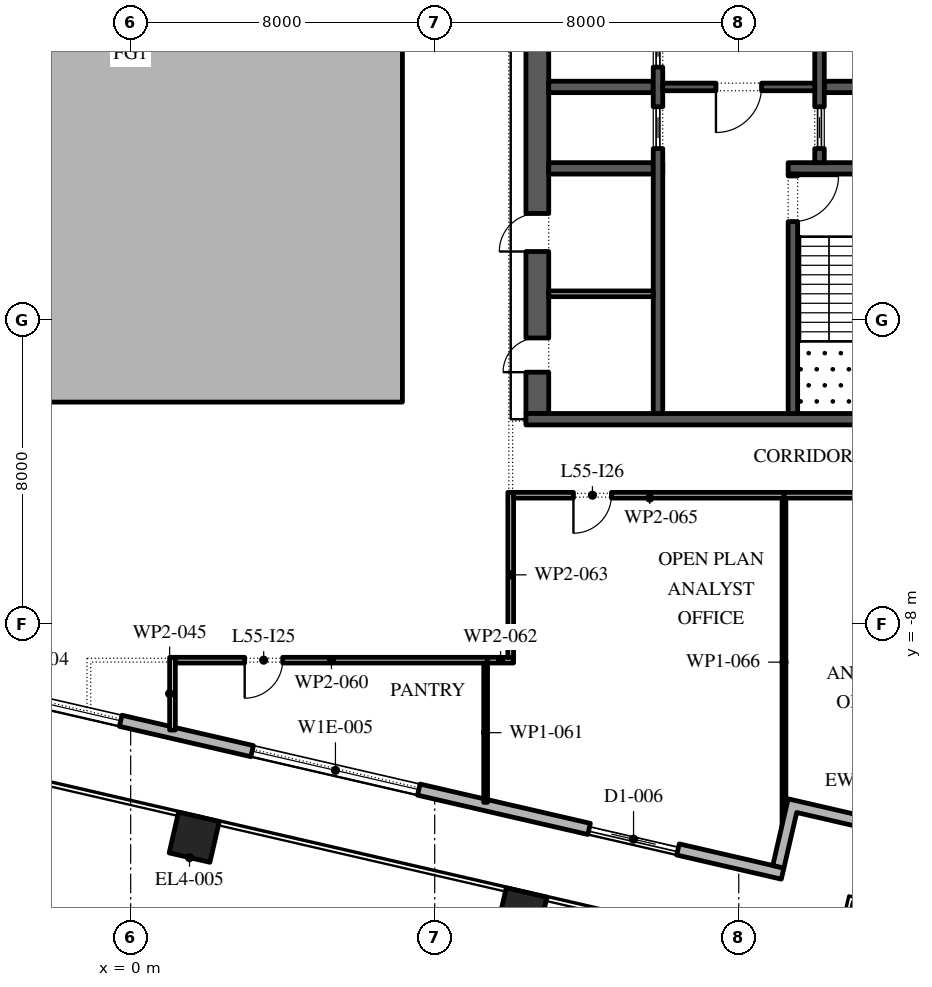
"""IFC4 building model, lengths in metres.
Left out: names, types, materials, properties, quantities, classifications, styles, units other than length and angle.
Written with IfcOpenShell. Run it as: python <this file> out.ifc"""

import sys

from ifc_helpers import new_model, si_unit, direction, frame, frame_2d, origin, origin_2d, place, context, subcontext, project, spatial, polyline, rectangle, outline, extrude, element, fill, save


model = new_model("IFC4")
c1 = context("Model", 3, precision=1e-05, world=origin(), true_north=direction((0.0, 1.0)))
c2 = subcontext(c1, "Body", "Model", "MODEL_VIEW")
j1 = project(units=[si_unit("LENGTHUNIT", "METRE"), si_unit("PLANEANGLEUNIT", "RADIAN")], contexts=[c1])
p1 = place(None, origin())
s1 = spatial("IfcSite", under=j1, at=p1, CompositionType="ELEMENT")
p2 = place(p1, origin())
s2 = spatial("IfcBuilding", under=s1, at=p2, CompositionType="ELEMENT")
p3 = place(p2, frame((0.0, 0.0, 255.6)))
s3 = spatial("IfcBuildingStorey", under=s2, at=p3, CompositionType="ELEMENT", Elevation=255.6)
for number, where, z_axis, x_axis in (
    (1, (1.672, -13.599, 0.0), (0.0, 0.0, 1.0), (0.974, -0.225, 0.0)),
    (2, (10.295, -15.59, 0.0), (0.0, 0.0, 1.0), (0.974, -0.225, 0.0)),
):
    element("IfcColumn", number, at=place(p3, frame(where, z_axis=z_axis, x_axis=x_axis)), inside=s3, PredefinedType="COLUMN", context=c2, shape_type="SweptSolid", body=[
        extrude(rectangle(XDim=1.1, YDim=1.1, at=origin_2d()), origin(), (0.0, 0.0, 1.0), 4.2),
    ])
p4 = place(p3, origin())
e3 = element("IfcWall", 3, at=p4, inside=s3, PredefinedType="STANDARD", context=c2, shape_type="SweptSolid", body=[
    extrude(outline(polyline([(-7.15, -2.15), (7.15, -2.15), (7.15, 16.15), (-7.15, 16.15), (-7.15, -2.15)]), holes=[polyline([(-7.0, -2.0), (-7.0, 16.0), (7.0, 16.0), (7.0, -2.0), (-7.0, -2.0)])]), origin(), (0.0, 0.0, 1.0), 4.0),
])
p5 = place(p3, frame((-29.616, -3.758, 0.0), z_axis=(0.0, 0.0, 1.0), x_axis=(0.974370532314, -0.224949029246, 0.0)))
e4 = element("IfcWall", 4, at=p5, inside=s3, PredefinedType="STANDARD", context=c2, shape_type="SweptSolid", body=[
    extrude(rectangle(XDim=48.0, YDim=0.3, at=frame_2d((24.0, 0.0))), origin(), (0.0, 0.0, 1.0), 4.0),
])
p6 = place(p5, frame((1.625, 0.0, 0.45)))
e5 = element("IfcOpeningElement", 5, at=p6, cuts=e4, PredefinedType="OPENING", context=c2, shape_type="SweptSolid", body=[
    extrude(rectangle(XDim=4.5, YDim=3.05, at=frame_2d((2.25, 1.525))), frame((0.0, 0.16, 0.0), z_axis=(0.0, -1.0, 0.0), x_axis=(1.0, 0.0, 0.0)), (0.0, 0.0, 1.0), 0.32),
])
p7 = place(p5, frame((10.575, 0.0, 0.0)))
e6 = element("IfcOpeningElement", 6, at=p7, cuts=e4, PredefinedType="OPENING", context=c2, shape_type="SweptSolid", body=[
    extrude(rectangle(XDim=2.4, YDim=3.5, at=frame_2d((1.2, 1.75))), frame((0.0, 0.16, 0.0), z_axis=(0.0, -1.0, 0.0), x_axis=(1.0, 0.0, 0.0)), (0.0, 0.0, 1.0), 0.32),
])
p8 = place(p5, frame((17.575, 0.0, 0.45)))
e7 = element("IfcOpeningElement", 7, at=p8, cuts=e4, PredefinedType="OPENING", context=c2, shape_type="SweptSolid", body=[
    extrude(rectangle(XDim=4.5, YDim=3.0, at=frame_2d((2.25, 1.5))), frame((0.0, 0.16, 0.0), z_axis=(0.0, -1.0, 0.0), x_axis=(1.0, 0.0, 0.0)), (0.0, 0.0, 1.0), 0.32),
])
p9 = place(p5, frame((25.625, 0.0, 0.45)))
e8 = element("IfcOpeningElement", 8, at=p9, cuts=e4, PredefinedType="OPENING", context=c2, shape_type="SweptSolid", body=[
    extrude(rectangle(XDim=4.5, YDim=3.05, at=frame_2d((2.25, 1.525))), frame((0.0, 0.16, 0.0), z_axis=(0.0, -1.0, 0.0), x_axis=(1.0, 0.0, 0.0)), (0.0, 0.0, 1.0), 0.32),
])
p10 = place(p5, frame((33.675, 0.0, 0.45)))
e9 = element("IfcOpeningElement", 9, at=p10, cuts=e4, PredefinedType="OPENING", context=c2, shape_type="SweptSolid", body=[
    extrude(rectangle(XDim=4.5, YDim=2.825, at=frame_2d((2.25, 1.413))), frame((0.0, 0.16, 0.0), z_axis=(0.0, -1.0, 0.0), x_axis=(1.0, 0.0, 0.0)), (0.0, 0.0, 1.0), 0.32),
])
p11 = place(p5, frame((42.775, 0.0, 0.0)))
e10 = element("IfcOpeningElement", 10, at=p11, cuts=e4, PredefinedType="OPENING", context=c2, shape_type="SweptSolid", body=[
    extrude(rectangle(XDim=2.4, YDim=3.5, at=frame_2d((1.2, 1.75))), frame((0.0, 0.16, 0.0), z_axis=(0.0, -1.0, 0.0), x_axis=(1.0, 0.0, 0.0)), (0.0, 0.0, 1.0), 0.32),
])
p12 = place(p3, origin())
e11 = element("IfcWall", 11, at=p12, inside=s3, PredefinedType="STANDARD", context=c2, shape_type="SweptSolid", body=[
    extrude(outline(polyline([(19.054, -12.993), (19.459, -11.24), (21.505, -11.712), (21.438, -12.004), (19.684, -11.599), (19.279, -13.353), (17.525, -12.948), (17.188, -14.41), (16.895, -14.342), (17.3, -12.588), (19.054, -12.993)])), origin(), (0.0, 0.0, 1.0), 4.0),
])
p13 = place(p3, frame((10.7, -2.45, 0.0), z_axis=(0.0, 0.0, 1.0), x_axis=(0.0, 1.0, 0.0)))
e12 = element("IfcWall", 12, at=p13, inside=s3, PredefinedType="SHEAR", context=c2, shape_type="SweptSolid", body=[
    extrude(rectangle(XDim=27.9, YDim=0.6, at=frame_2d((13.95, 0.0))), origin(), (0.0, 0.0, 1.0), 4.0),
])
p14 = place(p13, frame((23.65, 0.0, 0.0)))
e13 = element("IfcOpeningElement", 13, at=p14, cuts=e12, PredefinedType="OPENING", context=c2, shape_type="SweptSolid", body=[
    extrude(rectangle(XDim=2.4, YDim=2.1, at=frame_2d((1.2, 1.05))), frame((0.0, 0.31, 0.0), z_axis=(0.0, -1.0, 0.0), x_axis=(1.0, 0.0, 0.0)), (0.0, 0.0, 1.0), 0.62),
])
p15 = place(p13, frame((1.087, 0.0, 0.0)))
e14 = element("IfcOpeningElement", 14, at=p15, cuts=e12, PredefinedType="OPENING", context=c2, shape_type="SweptSolid", body=[
    extrude(rectangle(XDim=0.9, YDim=2.1, at=frame_2d((0.45, 1.05))), frame((0.0, 0.31, 0.0), z_axis=(0.0, -1.0, 0.0), x_axis=(1.0, 0.0, 0.0)), (0.0, 0.0, 1.0), 0.62),
])
p16 = place(p13, frame((4.262, 0.0, 0.0)))
e15 = element("IfcOpeningElement", 15, at=p16, cuts=e12, PredefinedType="OPENING", context=c2, shape_type="SweptSolid", body=[
    extrude(rectangle(XDim=1.0, YDim=2.1, at=frame_2d((0.5, 1.05))), frame((0.0, 0.31, 0.0), z_axis=(0.0, -1.0, 0.0), x_axis=(1.0, 0.0, 0.0)), (0.0, 0.0, 1.0), 0.62),
])
p17 = place(p3, frame((10.4, -2.6, 0.0), z_axis=(0.0, 0.0, 1.0), x_axis=(1.0, 0.0, 0.0)))
e16 = element("IfcWall", 16, at=p17, inside=s3, PredefinedType="SHEAR", context=c2, shape_type="SweptSolid", body=[
    extrude(rectangle(XDim=11.2, YDim=0.3, at=frame_2d((5.6, 0.0))), origin(), (0.0, 0.0, 1.0), 4.0),
])
p18 = place(p3, frame((17.3, 4.0, 0.0), z_axis=(0.0, 0.0, 1.0), x_axis=(1.0, 0.0, 0.0)))
e17 = element("IfcWall", 17, at=p18, inside=s3, PredefinedType="SHEAR", context=c2, shape_type="SweptSolid", body=[
    extrude(rectangle(XDim=3.7, YDim=0.3, at=frame_2d((1.85, 0.0))), origin(), (0.0, 0.0, 1.0), 4.0),
])
p19 = place(p3, frame((17.425, -2.45, 0.0), z_axis=(0.0, 0.0, 1.0), x_axis=(0.0, 1.0, 0.0)))
e18 = element("IfcWall", 18, at=p19, inside=s3, PredefinedType="SHEAR", context=c2, shape_type="SweptSolid", body=[
    extrude(rectangle(XDim=6.3, YDim=0.25, at=frame_2d((3.15, 0.0))), origin(), (0.0, 0.0, 1.0), 4.0),
])
p20 = place(p19, frame((5.05, 0.0, 0.0)))
e19 = element("IfcOpeningElement", 19, at=p20, cuts=e18, PredefinedType="OPENING", context=c2, shape_type="SweptSolid", body=[
    extrude(rectangle(XDim=1.2, YDim=2.1, at=frame_2d((0.6, 1.05))), frame((0.0, 0.135, 0.0), z_axis=(0.0, -1.0, 0.0), x_axis=(1.0, 0.0, 0.0)), (0.0, 0.0, 1.0), 0.27),
])
p21 = place(p3, frame((18.25, 6.143, 0.0), z_axis=(0.0, 0.0, 1.0), x_axis=(1.0, 0.0, 0.0)))
e20 = element("IfcWall", 20, at=p21, inside=s3, PredefinedType="SHEAR", context=c2, shape_type="SweptSolid", body=[
    extrude(rectangle(XDim=2.75, YDim=0.3, at=frame_2d((1.375, 0.0))), origin(), (0.0, 0.0, 1.0), 4.0),
])
p22 = place(p3, frame((18.125, 4.15, 0.0), z_axis=(0.0, 0.0, 1.0), x_axis=(0.0, 1.0, 0.0)))
e21 = element("IfcWall", 21, at=p22, inside=s3, PredefinedType="SHEAR", context=c2, shape_type="SweptSolid", body=[
    extrude(rectangle(XDim=14.7, YDim=0.25, at=frame_2d((7.35, 0.0))), origin(), (0.0, 0.0, 1.0), 4.0),
])
p23 = place(p22, frame((3.246, 0.0, 0.0)))
e22 = element("IfcOpeningElement", 22, at=p23, cuts=e21, PredefinedType="OPENING", context=c2, shape_type="SweptSolid", body=[
    extrude(rectangle(XDim=0.9, YDim=2.1, at=frame_2d((0.45, 1.05))), frame((0.0, 0.135, 0.0), z_axis=(0.0, -1.0, 0.0), x_axis=(1.0, 0.0, 0.0)), (0.0, 0.0, 1.0), 0.27),
])
p24 = place(p22, frame((8.454, 0.0, 0.0)))
e23 = element("IfcOpeningElement", 23, at=p24, cuts=e21, PredefinedType="OPENING", context=c2, shape_type="SweptSolid", body=[
    extrude(rectangle(XDim=0.9, YDim=2.1, at=frame_2d((0.45, 1.05))), frame((0.0, 0.135, 0.0), z_axis=(0.0, -1.0, 0.0), x_axis=(1.0, 0.0, 0.0)), (0.0, 0.0, 1.0), 0.27),
])
p25 = place(p22, frame((0.371, 0.0, 0.0)))
e24 = element("IfcOpeningElement", 24, at=p25, cuts=e21, PredefinedType="OPENING", context=c2, shape_type="SweptSolid", body=[
    extrude(rectangle(XDim=1.1, YDim=2.1, at=frame_2d((0.55, 1.05))), frame((0.0, 0.135, 0.0), z_axis=(0.0, -1.0, 0.0), x_axis=(1.0, 0.0, 0.0)), (0.0, 0.0, 1.0), 0.27),
])
p26 = place(p22, frame((13.229, 0.0, 0.0)))
e25 = element("IfcOpeningElement", 25, at=p26, cuts=e21, PredefinedType="OPENING", context=c2, shape_type="SweptSolid", body=[
    extrude(rectangle(XDim=1.1, YDim=2.1, at=frame_2d((0.55, 1.05))), frame((0.0, 0.135, 0.0), z_axis=(0.0, -1.0, 0.0), x_axis=(1.0, 0.0, 0.0)), (0.0, 0.0, 1.0), 0.27),
])
p27 = place(p3, frame((11.0, 4.0, 0.0), z_axis=(0.0, 0.0, 1.0), x_axis=(1.0, 0.0, 0.0)))
e26 = element("IfcWall", 26, at=p27, inside=s3, PredefinedType="SHEAR", context=c2, shape_type="SweptSolid", body=[
    extrude(rectangle(XDim=3.0, YDim=0.3, at=frame_2d((1.5, 0.0))), origin(), (0.0, 0.0, 1.0), 4.0),
])
p28 = place(p3, frame((11.0, 6.143, 0.0), z_axis=(0.0, 0.0, 1.0), x_axis=(1.0, 0.0, 0.0)))
e27 = element("IfcWall", 27, at=p28, inside=s3, PredefinedType="SHEAR", context=c2, shape_type="SweptSolid", body=[
    extrude(rectangle(XDim=2.75, YDim=0.3, at=frame_2d((1.375, 0.0))), origin(), (0.0, 0.0, 1.0), 4.0),
])
p29 = place(p3, frame((13.875, -2.45, 0.0), z_axis=(0.0, 0.0, 1.0), x_axis=(0.0, 1.0, 0.0)))
e28 = element("IfcWall", 28, at=p29, inside=s3, PredefinedType="SHEAR", context=c2, shape_type="SweptSolid", body=[
    extrude(rectangle(XDim=21.3, YDim=0.25, at=frame_2d((10.65, 0.0))), origin(), (0.0, 0.0, 1.0), 4.0),
])
p30 = place(p29, frame((16.261, 0.0, 0.0)))
e29 = element("IfcOpeningElement", 29, at=p30, cuts=e28, PredefinedType="OPENING", context=c2, shape_type="SweptSolid", body=[
    extrude(rectangle(XDim=0.9, YDim=2.1, at=frame_2d((0.45, 1.05))), frame((0.0, 0.135, 0.0), z_axis=(0.0, -1.0, 0.0), x_axis=(1.0, 0.0, 0.0)), (0.0, 0.0, 1.0), 0.27),
])
p31 = place(p29, frame((19.325, 0.0, 0.0)))
e30 = element("IfcOpeningElement", 30, at=p31, cuts=e28, PredefinedType="OPENING", context=c2, shape_type="SweptSolid", body=[
    extrude(rectangle(XDim=0.9, YDim=2.1, at=frame_2d((0.45, 1.05))), frame((0.0, 0.135, 0.0), z_axis=(0.0, -1.0, 0.0), x_axis=(1.0, 0.0, 0.0)), (0.0, 0.0, 1.0), 0.27),
])
p32 = place(p29, frame((6.971, 0.0, 0.0)))
e31 = element("IfcOpeningElement", 31, at=p32, cuts=e28, PredefinedType="OPENING", context=c2, shape_type="SweptSolid", body=[
    extrude(rectangle(XDim=1.1, YDim=2.1, at=frame_2d((0.55, 1.05))), frame((0.0, 0.135, 0.0), z_axis=(0.0, -1.0, 0.0), x_axis=(1.0, 0.0, 0.0)), (0.0, 0.0, 1.0), 0.27),
])
p33 = place(p29, frame((9.114, 0.0, 0.0)))
e32 = element("IfcOpeningElement", 32, at=p33, cuts=e28, PredefinedType="OPENING", context=c2, shape_type="SweptSolid", body=[
    extrude(rectangle(XDim=1.1, YDim=2.1, at=frame_2d((0.55, 1.05))), frame((0.0, 0.135, 0.0), z_axis=(0.0, -1.0, 0.0), x_axis=(1.0, 0.0, 0.0)), (0.0, 0.0, 1.0), 0.27),
])
p34 = place(p29, frame((11.257, 0.0, 0.0)))
e33 = element("IfcOpeningElement", 33, at=p34, cuts=e28, PredefinedType="OPENING", context=c2, shape_type="SweptSolid", body=[
    extrude(rectangle(XDim=1.1, YDim=2.1, at=frame_2d((0.55, 1.05))), frame((0.0, 0.135, 0.0), z_axis=(0.0, -1.0, 0.0), x_axis=(1.0, 0.0, 0.0)), (0.0, 0.0, 1.0), 0.27),
])
p35 = place(p29, frame((13.4, 0.0, 0.0)))
e34 = element("IfcOpeningElement", 34, at=p35, cuts=e28, PredefinedType="OPENING", context=c2, shape_type="SweptSolid", body=[
    extrude(rectangle(XDim=1.1, YDim=2.1, at=frame_2d((0.55, 1.05))), frame((0.0, 0.135, 0.0), z_axis=(0.0, -1.0, 0.0), x_axis=(1.0, 0.0, 0.0)), (0.0, 0.0, 1.0), 0.27),
])
p36 = place(p3, frame((14.0, 6.143, 0.0), z_axis=(0.0, 0.0, 1.0), x_axis=(1.0, 0.0, 0.0)))
e35 = element("IfcWall", 35, at=p36, inside=s3, PredefinedType="SHEAR", context=c2, shape_type="SweptSolid", body=[
    extrude(rectangle(XDim=4.0, YDim=0.2, at=frame_2d((2.0, 0.0))), origin(), (0.0, 0.0, 1.0), 4.0),
])
p37 = place(p36, frame((1.4, 0.0, 0.0)))
e36 = element("IfcOpeningElement", 36, at=p37, cuts=e35, PredefinedType="OPENING", context=c2, shape_type="SweptSolid", body=[
    extrude(rectangle(XDim=1.2, YDim=2.1, at=frame_2d((0.6, 1.05))), frame((0.0, 0.11, 0.0), z_axis=(0.0, -1.0, 0.0), x_axis=(1.0, 0.0, 0.0)), (0.0, 0.0, 1.0), 0.22),
])
p38 = place(p3, frame((11.0, 0.7, 0.0), z_axis=(0.0, 0.0, 1.0), x_axis=(1.0, 0.0, 0.0)))
e37 = element("IfcWall", 37, at=p38, inside=s3, PredefinedType="PARTITIONING", context=c2, shape_type="SweptSolid", body=[
    extrude(rectangle(XDim=2.75, YDim=0.15, at=frame_2d((1.375, 0.0))), origin(), (0.0, 0.0, 1.0), 4.0),
])
p39 = place(p3, frame((1.1, -8.865, 0.0), z_axis=(0.0, 0.0, 1.0), x_axis=(0.0, -1.0, 0.0)))
e38 = element("IfcWall", 38, at=p39, inside=s3, PredefinedType="PARTITIONING", context=c2, shape_type="SweptSolid", body=[
    extrude(rectangle(XDim=1.913, YDim=0.15, at=frame_2d((0.957, 0.0))), origin(), (0.0, 0.0, 1.0), 4.0),
])
p40 = place(p3, frame((9.39, -8.94, 0.0), z_axis=(0.0, 0.0, 1.0), x_axis=(-1.0, 0.0, 0.0)))
e39 = element("IfcWall", 39, at=p40, inside=s3, PredefinedType="PARTITIONING", context=c2, shape_type="SweptSolid", body=[
    extrude(rectangle(XDim=8.215, YDim=0.15, at=frame_2d((4.107, 0.0))), origin(), (0.0, 0.0, 1.0), 4.0),
])
p41 = place(p40, frame((5.39, 0.0, 0.0)))
e40 = element("IfcOpeningElement", 40, at=p41, cuts=e39, PredefinedType="OPENING", context=c2, shape_type="SweptSolid", body=[
    extrude(rectangle(XDim=1.0, YDim=2.1, at=frame_2d((0.5, 1.05))), frame((0.0, 0.085, 0.0), z_axis=(0.0, -1.0, 0.0), x_axis=(1.0, 0.0, 0.0)), (0.0, 0.0, 1.0), 0.17),
])
p42 = place(p3, frame((9.34, -9.015, 0.0), z_axis=(0.0, 0.0, 1.0), x_axis=(0.0, -1.0, 0.0)))
e41 = element("IfcWall", 41, at=p42, inside=s3, PredefinedType="PARTITIONING", context=c2, shape_type="SweptSolid", body=[
    extrude(rectangle(XDim=3.666, YDim=0.1, at=frame_2d((1.833, 0.0))), origin(), (0.0, 0.0, 1.0), 4.0),
])
p43 = place(p3, frame((10.075, -8.94, 0.0), z_axis=(0.0, 0.0, 1.0), x_axis=(-1.0, 0.0, 0.0)))
e42 = element("IfcWall", 42, at=p43, inside=s3, PredefinedType="PARTITIONING", context=c2, shape_type="SweptSolid", body=[
    extrude(rectangle(XDim=0.685, YDim=0.15, at=frame_2d((0.343, 0.0))), origin(), (0.0, 0.0, 1.0), 4.0),
])
p44 = place(p3, frame((10.0, -4.525, 0.0), z_axis=(0.0, 0.0, 1.0), x_axis=(0.0, -1.0, 0.0)))
e43 = element("IfcWall", 43, at=p44, inside=s3, PredefinedType="PARTITIONING", context=c2, shape_type="SweptSolid", body=[
    extrude(rectangle(XDim=4.34, YDim=0.15, at=frame_2d((2.17, 0.0))), origin(), (0.0, 0.0, 1.0), 4.0),
])
p45 = place(p3, frame((17.24, -4.6, 0.0), z_axis=(0.0, 0.0, 1.0), x_axis=(-1.0, 0.0, 0.0)))
e44 = element("IfcWall", 44, at=p45, inside=s3, PredefinedType="PARTITIONING", context=c2, shape_type="SweptSolid", body=[
    extrude(rectangle(XDim=7.165, YDim=0.15, at=frame_2d((3.583, 0.0))), origin(), (0.0, 0.0, 1.0), 4.0),
])
p46 = place(p45, frame((4.59, 0.0, 0.0)))
e45 = element("IfcOpeningElement", 45, at=p46, cuts=e44, PredefinedType="OPENING", context=c2, shape_type="SweptSolid", body=[
    extrude(rectangle(XDim=1.0, YDim=2.1, at=frame_2d((0.5, 1.05))), frame((0.0, 0.085, 0.0), z_axis=(0.0, -1.0, 0.0), x_axis=(1.0, 0.0, 0.0)), (0.0, 0.0, 1.0), 0.17),
])
p47 = place(p3, frame((17.19, -4.675, 0.0), z_axis=(0.0, 0.0, 1.0), x_axis=(0.0, -1.0, 0.0)))
e46 = element("IfcWall", 46, at=p47, inside=s3, PredefinedType="PARTITIONING", context=c2, shape_type="SweptSolid", body=[
    extrude(rectangle(XDim=8.635, YDim=0.1, at=frame_2d((4.317, 0.0))), origin(), (0.0, 0.0, 1.0), 4.0),
])
p48 = place(p3, frame((22.922, -4.6, 0.0), z_axis=(0.0, 0.0, 1.0), x_axis=(-1.0, 0.0, 0.0)))
e47 = element("IfcWall", 47, at=p48, inside=s3, PredefinedType="PARTITIONING", context=c2, shape_type="SweptSolid", body=[
    extrude(rectangle(XDim=5.732, YDim=0.15, at=frame_2d((2.866, 0.0))), origin(), (0.0, 0.0, 1.0), 4.0),
])
p49 = place(p48, frame((1.582, 0.0, 0.0)))
e48 = element("IfcOpeningElement", 48, at=p49, cuts=e47, PredefinedType="OPENING", context=c2, shape_type="SweptSolid", body=[
    extrude(rectangle(XDim=1.0, YDim=2.1, at=frame_2d((0.5, 1.05))), frame((0.0, 0.085, 0.0), z_axis=(0.0, -1.0, 0.0), x_axis=(1.0, 0.0, 0.0)), (0.0, 0.0, 1.0), 0.17),
])
p50 = place(p9, origin())
e49 = element("IfcWindow", 49, at=p50, inside=s3, PartitioningType="DOUBLE_PANEL_VERTICAL", PredefinedType="WINDOW", context=c2, shape_type="SweptSolid", body=[
    extrude(rectangle(XDim=4.5, YDim=3.05, at=frame_2d((2.25, 1.525))), frame((0.0, 0.03, 0.0), z_axis=(0.0, -1.0, 0.0), x_axis=(1.0, 0.0, 0.0)), (0.0, 0.0, 1.0), 0.06),
])
fill(e8, e49)
p51 = place(p10, origin())
e50 = element("IfcWindow", 50, at=p51, inside=s3, PartitioningType="DOUBLE_PANEL_VERTICAL", PredefinedType="WINDOW", context=c2, shape_type="SweptSolid", body=[
    extrude(rectangle(XDim=4.5, YDim=2.825, at=frame_2d((2.25, 1.413))), frame((0.0, 0.03, 0.0), z_axis=(0.0, -1.0, 0.0), x_axis=(1.0, 0.0, 0.0)), (0.0, 0.0, 1.0), 0.06),
])
fill(e9, e50)
p52 = place(p11, origin())
e51 = element("IfcDoor", 51, at=p52, inside=s3, OperationType="DOUBLE_DOOR_SLIDING", PredefinedType="DOOR", context=c2, shape_type="SweptSolid", body=[
    extrude(rectangle(XDim=2.4, YDim=3.5, at=frame_2d((1.2, 1.75))), frame((0.0, 0.025, 0.0), z_axis=(0.0, -1.0, 0.0), x_axis=(1.0, 0.0, 0.0)), (0.0, 0.0, 1.0), 0.05),
])
fill(e10, e51)
p53 = place(p25, origin())
e52 = element("IfcDoor", 52, at=p53, inside=s3, OperationType="SLIDING_TO_LEFT", PredefinedType="DOOR", context=c2, shape_type="SweptSolid", body=[
    extrude(rectangle(XDim=1.1, YDim=2.1, at=frame_2d((0.55, 1.05))), frame((0.0, 0.025, 0.0), z_axis=(0.0, -1.0, 0.0), x_axis=(1.0, 0.0, 0.0)), (0.0, 0.0, 1.0), 0.05),
])
fill(e24, e52)
p54 = place(p32, origin())
e53 = element("IfcDoor", 53, at=p54, inside=s3, OperationType="SLIDING_TO_LEFT", PredefinedType="DOOR", context=c2, shape_type="SweptSolid", body=[
    extrude(rectangle(XDim=1.1, YDim=2.1, at=frame_2d((0.55, 1.05))), frame((0.0, 0.025, 0.0), z_axis=(0.0, -1.0, 0.0), x_axis=(1.0, 0.0, 0.0)), (0.0, 0.0, 1.0), 0.05),
])
fill(e31, e53)
p55 = place(p33, origin())
e54 = element("IfcDoor", 54, at=p55, inside=s3, OperationType="SLIDING_TO_LEFT", PredefinedType="DOOR", context=c2, shape_type="SweptSolid", body=[
    extrude(rectangle(XDim=1.1, YDim=2.1, at=frame_2d((0.55, 1.05))), frame((0.0, 0.025, 0.0), z_axis=(0.0, -1.0, 0.0), x_axis=(1.0, 0.0, 0.0)), (0.0, 0.0, 1.0), 0.05),
])
fill(e32, e54)
p56 = place(p37, frame((1.2, 0.0, 0.0), z_axis=(0.0, 0.0, 1.0), x_axis=(-1.0, 0.0, 0.0)))
e55 = element("IfcDoor", 55, at=p56, inside=s3, OperationType="SINGLE_SWING_LEFT", PredefinedType="DOOR", context=c2, shape_type="SweptSolid", body=[
    extrude(rectangle(XDim=1.2, YDim=2.1, at=frame_2d((0.6, 1.05))), frame((0.0, 0.025, 0.0), z_axis=(0.0, -1.0, 0.0), x_axis=(1.0, 0.0, 0.0)), (0.0, 0.0, 1.0), 0.05),
])
fill(e36, e55)
p57 = place(p20, frame((1.2, 0.0, 0.0), z_axis=(0.0, 0.0, 1.0), x_axis=(-1.0, 0.0, 0.0)))
e56 = element("IfcDoor", 56, at=p57, inside=s3, OperationType="SINGLE_SWING_RIGHT", PredefinedType="DOOR", context=c2, shape_type="SweptSolid", body=[
    extrude(rectangle(XDim=1.2, YDim=2.1, at=frame_2d((0.6, 1.05))), frame((0.0, 0.025, 0.0), z_axis=(0.0, -1.0, 0.0), x_axis=(1.0, 0.0, 0.0)), (0.0, 0.0, 1.0), 0.05),
])
fill(e19, e56)
p58 = place(p15, origin())
e57 = element("IfcDoor", 57, at=p58, inside=s3, OperationType="SINGLE_SWING_RIGHT", PredefinedType="DOOR", context=c2, shape_type="SweptSolid", body=[
    extrude(rectangle(XDim=0.9, YDim=2.1, at=frame_2d((0.45, 1.05))), frame((0.0, -0.25, 0.0), z_axis=(0.0, -1.0, 0.0), x_axis=(1.0, 0.0, 0.0)), (0.0, 0.0, 1.0), 0.05),
])
fill(e14, e57)
p59 = place(p16, origin())
e58 = element("IfcDoor", 58, at=p59, inside=s3, OperationType="SINGLE_SWING_RIGHT", PredefinedType="DOOR", context=c2, shape_type="SweptSolid", body=[
    extrude(rectangle(XDim=1.0, YDim=2.1, at=frame_2d((0.5, 1.05))), frame((0.0, -0.25, 0.0), z_axis=(0.0, -1.0, 0.0), x_axis=(1.0, 0.0, 0.0)), (0.0, 0.0, 1.0), 0.05),
])
fill(e15, e58)
p60 = place(p41, origin())
e59 = element("IfcDoor", 59, at=p60, inside=s3, OperationType="SINGLE_SWING_LEFT", PredefinedType="DOOR", context=c2, shape_type="SweptSolid", body=[
    extrude(rectangle(XDim=1.0, YDim=2.1, at=frame_2d((0.5, 1.05))), frame((0.0, 0.025, 0.0), z_axis=(0.0, -1.0, 0.0), x_axis=(1.0, 0.0, 0.0)), (0.0, 0.0, 1.0), 0.05),
])
fill(e40, e59)
p61 = place(p46, origin())
e60 = element("IfcDoor", 60, at=p61, inside=s3, OperationType="SINGLE_SWING_LEFT", PredefinedType="DOOR", context=c2, shape_type="SweptSolid", body=[
    extrude(rectangle(XDim=1.0, YDim=2.1, at=frame_2d((0.5, 1.05))), frame((0.0, 0.025, 0.0), z_axis=(0.0, -1.0, 0.0), x_axis=(1.0, 0.0, 0.0)), (0.0, 0.0, 1.0), 0.05),
])
fill(e45, e60)
save(model, sys.argv[1])
